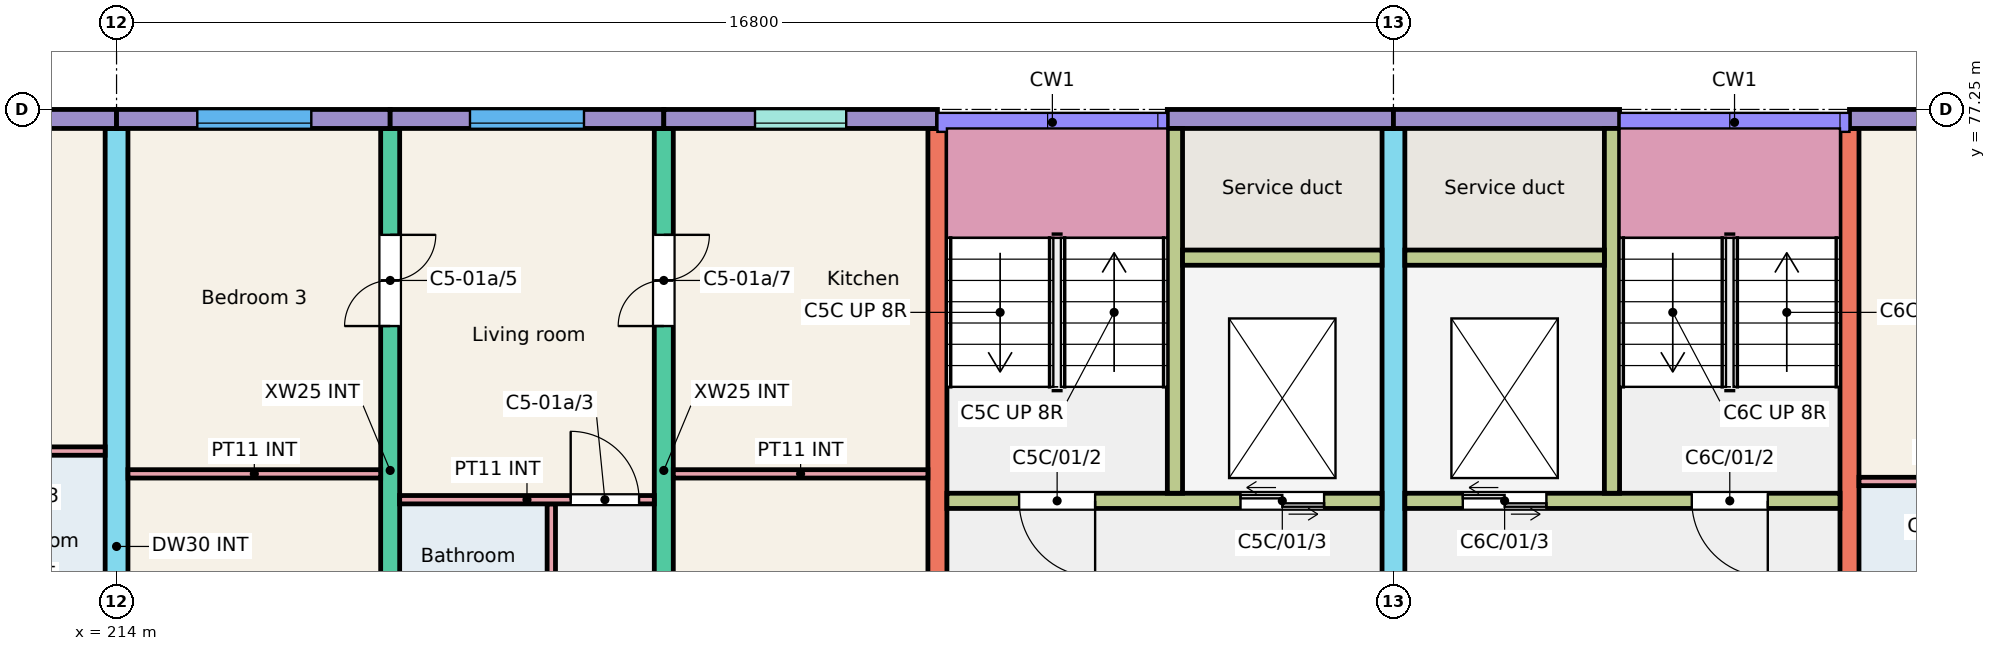
"""IFC4 building model, lengths in metres.
Left out: names, types, materials, properties, quantities, classifications, styles, units other than length and angle.
Written with IfcOpenShell. Run it as: python <this file> out.ifc"""

import sys

from ifc_helpers import new_model, si_unit, direction, frame, frame_2d, origin, place, context, subcontext, project, spatial, rectangle, extrude, element, fill, save


model = new_model("IFC4")
c1 = context("Model", 3, precision=1e-05, world=origin(), true_north=direction((0.0, 1.0)))
c2 = subcontext(c1, "Body", "Model", "MODEL_VIEW")
j1 = project(units=[si_unit("LENGTHUNIT", "METRE"), si_unit("PLANEANGLEUNIT", "RADIAN")], contexts=[c1])
p1 = place(None, origin())
s1 = spatial("IfcSite", under=j1, at=p1, CompositionType="ELEMENT")
p2 = place(p1, origin())
s2 = spatial("IfcBuilding", under=s1, at=p2, CompositionType="ELEMENT")
p3 = place(p2, frame((0.0, 0.0, 3.0)))
s3 = spatial("IfcBuildingStorey", under=s2, at=p3, CompositionType="ELEMENT", Elevation=3.0)
p4 = place(p3, frame((214.0, 66.0, 0.0), z_axis=(0.0, 0.0, 1.0), x_axis=(0.0, 1.0, 0.0)))
e1 = element("IfcWall", 1, at=p4, inside=s3, PredefinedType="SHEAR", context=c2, shape_type="SweptSolid", body=[
    extrude(rectangle(XDim=11.0, YDim=0.3, at=frame_2d((5.5, 0.0))), origin(), (0.0, 0.0, 1.0), 3.0),
])
p5 = place(p4, frame((0.3, 0.0, 0.0)))
e2 = element("IfcOpeningElement", 2, at=p5, cuts=e1, PredefinedType="OPENING", context=c2, shape_type="SweptSolid", body=[
    extrude(rectangle(XDim=1.2, YDim=2.1, at=frame_2d((0.6, 1.05))), frame((0.0, 0.16, 0.0), z_axis=(0.0, -1.0, 0.0), x_axis=(1.0, 0.0, 0.0)), (0.0, 0.0, 1.0), 0.32),
])
p6 = place(p3, frame((217.6, 68.0, 0.0), z_axis=(0.0, 0.0, 1.0), x_axis=(0.0, 1.0, 0.0)))
e3 = element("IfcWall", 3, at=p6, inside=s3, PredefinedType="SHEAR", context=c2, shape_type="SweptSolid", body=[
    extrude(rectangle(XDim=9.0, YDim=0.25, at=frame_2d((4.5, 0.0))), origin(), (0.0, 0.0, 1.0), 3.0),
])
p7 = place(p6, frame((0.175, 0.0, 0.0)))
e4 = element("IfcOpeningElement", 4, at=p7, cuts=e3, PredefinedType="OPENING", context=c2, shape_type="SweptSolid", body=[
    extrude(rectangle(XDim=1.2, YDim=2.1, at=frame_2d((0.6, 1.05))), frame((0.0, 0.135, 0.0), z_axis=(0.0, -1.0, 0.0), x_axis=(1.0, 0.0, 0.0)), (0.0, 0.0, 1.0), 0.27),
])
p8 = place(p6, frame((6.4, 0.0, 0.0)))
e5 = element("IfcOpeningElement", 5, at=p8, cuts=e3, PredefinedType="OPENING", context=c2, shape_type="SweptSolid", body=[
    extrude(rectangle(XDim=1.2, YDim=2.1, at=frame_2d((0.6, 1.05))), frame((0.0, 0.135, 0.0), z_axis=(0.0, -1.0, 0.0), x_axis=(1.0, 0.0, 0.0)), (0.0, 0.0, 1.0), 0.27),
])
p9 = place(p3, frame((221.2, 68.0, 0.0), z_axis=(0.0, 0.0, 1.0), x_axis=(0.0, 1.0, 0.0)))
e6 = element("IfcWall", 6, at=p9, inside=s3, PredefinedType="SHEAR", context=c2, shape_type="SweptSolid", body=[
    extrude(rectangle(XDim=9.0, YDim=0.25, at=frame_2d((4.5, 0.0))), origin(), (0.0, 0.0, 1.0), 3.0),
])
p10 = place(p9, frame((0.175, 0.0, 0.0)))
e7 = element("IfcOpeningElement", 7, at=p10, cuts=e6, PredefinedType="OPENING", context=c2, shape_type="SweptSolid", body=[
    extrude(rectangle(XDim=1.2, YDim=2.1, at=frame_2d((0.6, 1.05))), frame((0.0, 0.135, 0.0), z_axis=(0.0, -1.0, 0.0), x_axis=(1.0, 0.0, 0.0)), (0.0, 0.0, 1.0), 0.27),
])
p11 = place(p9, frame((6.4, 0.0, 0.0)))
e8 = element("IfcOpeningElement", 8, at=p11, cuts=e6, PredefinedType="OPENING", context=c2, shape_type="SweptSolid", body=[
    extrude(rectangle(XDim=1.2, YDim=2.1, at=frame_2d((0.6, 1.05))), frame((0.0, 0.135, 0.0), z_axis=(0.0, -1.0, 0.0), x_axis=(1.0, 0.0, 0.0)), (0.0, 0.0, 1.0), 0.27),
])
p12 = place(p3, frame((224.8, 68.0, 0.0), z_axis=(0.0, 0.0, 1.0), x_axis=(0.0, 1.0, 0.0)))
e9 = element("IfcWall", 9, at=p12, inside=s3, PredefinedType="SHEAR", context=c2, shape_type="SweptSolid", body=[
    extrude(rectangle(XDim=9.0, YDim=0.25, at=frame_2d((4.5, 0.0))), origin(), (0.0, 0.0, 1.0), 3.0),
])
p13 = place(p3, frame((230.8, 66.0, 0.0), z_axis=(0.0, 0.0, 1.0), x_axis=(0.0, 1.0, 0.0)))
e10 = element("IfcWall", 10, at=p13, inside=s3, PredefinedType="SHEAR", context=c2, shape_type="SweptSolid", body=[
    extrude(rectangle(XDim=11.0, YDim=0.3, at=frame_2d((5.5, 0.0))), origin(), (0.0, 0.0, 1.0), 3.0),
])
p14 = place(p13, frame((0.3, 0.0, 0.0)))
e11 = element("IfcOpeningElement", 11, at=p14, cuts=e10, PredefinedType="OPENING", context=c2, shape_type="SweptSolid", body=[
    extrude(rectangle(XDim=1.2, YDim=2.1, at=frame_2d((0.6, 1.05))), frame((0.0, 0.16, 0.0), z_axis=(0.0, -1.0, 0.0), x_axis=(1.0, 0.0, 0.0)), (0.0, 0.0, 1.0), 0.32),
])
p15 = place(p3, frame((236.8, 68.0, 0.0), z_axis=(0.0, 0.0, 1.0), x_axis=(0.0, 1.0, 0.0)))
e12 = element("IfcWall", 12, at=p15, inside=s3, PredefinedType="SHEAR", context=c2, shape_type="SweptSolid", body=[
    extrude(rectangle(XDim=9.0, YDim=0.25, at=frame_2d((4.5, 0.0))), origin(), (0.0, 0.0, 1.0), 3.0),
])
p16 = place(p3, frame((210.4, 77.125, 0.0), z_axis=(0.0, 0.0, 1.0), x_axis=(1.0, 0.0, 0.0)))
e13 = element("IfcWall", 13, at=p16, inside=s3, PredefinedType="SOLIDWALL", context=c2, shape_type="SweptSolid", body=[
    extrude(rectangle(XDim=3.6, YDim=0.25, at=frame_2d((1.8, 0.0))), origin(), (0.0, 0.0, 1.0), 3.0),
])
p17 = place(p16, frame((1.025, 0.0, 0.9)))
e14 = element("IfcOpeningElement", 14, at=p17, cuts=e13, PredefinedType="OPENING", context=c2, shape_type="SweptSolid", body=[
    extrude(rectangle(XDim=1.5, YDim=1.5, at=frame_2d((0.75, 0.75))), frame((0.0, 0.135, 0.0), z_axis=(0.0, -1.0, 0.0), x_axis=(1.0, 0.0, 0.0)), (0.0, 0.0, 1.0), 0.27),
])
p18 = place(p3, frame((214.0, 77.125, 0.0), z_axis=(0.0, 0.0, 1.0), x_axis=(1.0, 0.0, 0.0)))
e15 = element("IfcWall", 15, at=p18, inside=s3, PredefinedType="SOLIDWALL", context=c2, shape_type="SweptSolid", body=[
    extrude(rectangle(XDim=3.6, YDim=0.25, at=frame_2d((1.8, 0.0))), origin(), (0.0, 0.0, 1.0), 3.0),
])
p19 = place(p18, frame((1.062, 0.0, 0.9)))
e16 = element("IfcOpeningElement", 16, at=p19, cuts=e15, PredefinedType="OPENING", context=c2, shape_type="SweptSolid", body=[
    extrude(rectangle(XDim=1.5, YDim=1.5, at=frame_2d((0.75, 0.75))), frame((0.0, 0.135, 0.0), z_axis=(0.0, -1.0, 0.0), x_axis=(1.0, 0.0, 0.0)), (0.0, 0.0, 1.0), 0.27),
])
p20 = place(p3, frame((217.6, 77.125, 0.0), z_axis=(0.0, 0.0, 1.0), x_axis=(1.0, 0.0, 0.0)))
e17 = element("IfcWall", 17, at=p20, inside=s3, PredefinedType="SOLIDWALL", context=c2, shape_type="SweptSolid", body=[
    extrude(rectangle(XDim=3.6, YDim=0.25, at=frame_2d((1.8, 0.0))), origin(), (0.0, 0.0, 1.0), 3.0),
])
p21 = place(p20, frame((1.05, 0.0, 0.9)))
e18 = element("IfcOpeningElement", 18, at=p21, cuts=e17, PredefinedType="OPENING", context=c2, shape_type="SweptSolid", body=[
    extrude(rectangle(XDim=1.5, YDim=1.5, at=frame_2d((0.75, 0.75))), frame((0.0, 0.135, 0.0), z_axis=(0.0, -1.0, 0.0), x_axis=(1.0, 0.0, 0.0)), (0.0, 0.0, 1.0), 0.27),
])
p22 = place(p3, frame((221.2, 77.125, 0.0), z_axis=(0.0, 0.0, 1.0), x_axis=(1.0, 0.0, 0.0)))
e19 = element("IfcWall", 19, at=p22, inside=s3, PredefinedType="SOLIDWALL", context=c2, shape_type="SweptSolid", body=[
    extrude(rectangle(XDim=3.6, YDim=0.25, at=frame_2d((1.8, 0.0))), origin(), (0.0, 0.0, 1.0), 3.0),
])
p23 = place(p22, frame((1.2, 0.0, 1.1)))
e20 = element("IfcOpeningElement", 20, at=p23, cuts=e19, PredefinedType="OPENING", context=c2, shape_type="SweptSolid", body=[
    extrude(rectangle(XDim=1.2, YDim=1.3, at=frame_2d((0.6, 0.65))), frame((0.0, 0.135, 0.0), z_axis=(0.0, -1.0, 0.0), x_axis=(1.0, 0.0, 0.0)), (0.0, 0.0, 1.0), 0.27),
])
p24 = place(p3, frame((227.825, 77.125, 0.0), z_axis=(0.0, 0.0, 1.0), x_axis=(1.0, 0.0, 0.0)))
e21 = element("IfcWall", 21, at=p24, inside=s3, PredefinedType="SOLIDWALL", context=c2, shape_type="SweptSolid", body=[
    extrude(rectangle(XDim=2.975, YDim=0.25, at=frame_2d((1.488, 0.0))), origin(), (0.0, 0.0, 1.0), 3.0),
])
p25 = place(p3, frame((224.925, 72.1, 0.0), z_axis=(0.0, 0.0, 1.0), x_axis=(1.0, 0.0, 0.0)))
e22 = element("IfcWall", 22, at=p25, inside=s3, PredefinedType="SHEAR", context=c2, shape_type="SweptSolid", body=[
    extrude(rectangle(XDim=5.725, YDim=0.2, at=frame_2d((2.862, 0.0))), origin(), (0.0, 0.0, 1.0), 3.0),
])
p26 = place(p25, frame((0.95, 0.0, 0.0)))
e23 = element("IfcOpeningElement", 23, at=p26, cuts=e22, PredefinedType="OPENING", context=c2, shape_type="SweptSolid", body=[
    extrude(rectangle(XDim=1.0, YDim=2.1, at=frame_2d((0.5, 1.05))), frame((0.0, 0.11, 0.0), z_axis=(0.0, -1.0, 0.0), x_axis=(1.0, 0.0, 0.0)), (0.0, 0.0, 1.0), 0.22),
])
p27 = place(p25, frame((3.863, 0.0, 0.0)))
e24 = element("IfcOpeningElement", 24, at=p27, cuts=e22, PredefinedType="OPENING", context=c2, shape_type="SweptSolid", body=[
    extrude(rectangle(XDim=1.1, YDim=2.1, at=frame_2d((0.55, 1.05))), frame((0.0, 0.11, 0.0), z_axis=(0.0, -1.0, 0.0), x_axis=(1.0, 0.0, 0.0)), (0.0, 0.0, 1.0), 0.22),
])
p28 = place(p3, frame((227.925, 72.2, 0.0), z_axis=(0.0, 0.0, 1.0), x_axis=(0.0, 1.0, 0.0)))
e25 = element("IfcWall", 25, at=p28, inside=s3, PredefinedType="SHEAR", context=c2, shape_type="SweptSolid", body=[
    extrude(rectangle(XDim=4.8, YDim=0.2, at=frame_2d((2.4, 0.0))), origin(), (0.0, 0.0, 1.0), 3.0),
])
p29 = place(p3, frame((228.025, 75.3, 0.0), z_axis=(0.0, 0.0, 1.0), x_axis=(1.0, 0.0, 0.0)))
e26 = element("IfcWall", 26, at=p29, inside=s3, PredefinedType="SHEAR", context=c2, shape_type="SweptSolid", body=[
    extrude(rectangle(XDim=2.625, YDim=0.2, at=frame_2d((1.312, 0.0))), origin(), (0.0, 0.0, 1.0), 3.0),
])
p30 = place(p3, frame((230.8, 77.125, 0.0), z_axis=(0.0, 0.0, 1.0), x_axis=(1.0, 0.0, 0.0)))
e27 = element("IfcWall", 27, at=p30, inside=s3, PredefinedType="SOLIDWALL", context=c2, shape_type="SweptSolid", body=[
    extrude(rectangle(XDim=2.975, YDim=0.25, at=frame_2d((1.487, 0.0))), origin(), (0.0, 0.0, 1.0), 3.0),
])
p31 = place(p3, frame((230.95, 72.1, 0.0), z_axis=(0.0, 0.0, 1.0), x_axis=(1.0, 0.0, 0.0)))
e28 = element("IfcWall", 28, at=p31, inside=s3, PredefinedType="SHEAR", context=c2, shape_type="SweptSolid", body=[
    extrude(rectangle(XDim=5.725, YDim=0.2, at=frame_2d((2.863, 0.0))), origin(), (0.0, 0.0, 1.0), 3.0),
])
p32 = place(p31, frame((3.775, 0.0, 0.0)))
e29 = element("IfcOpeningElement", 29, at=p32, cuts=e28, PredefinedType="OPENING", context=c2, shape_type="SweptSolid", body=[
    extrude(rectangle(XDim=1.0, YDim=2.1, at=frame_2d((0.5, 1.05))), frame((0.0, 0.11, 0.0), z_axis=(0.0, -1.0, 0.0), x_axis=(1.0, 0.0, 0.0)), (0.0, 0.0, 1.0), 0.22),
])
p33 = place(p31, frame((0.762, 0.0, 0.0)))
e30 = element("IfcOpeningElement", 30, at=p33, cuts=e28, PredefinedType="OPENING", context=c2, shape_type="SweptSolid", body=[
    extrude(rectangle(XDim=1.1, YDim=2.1, at=frame_2d((0.55, 1.05))), frame((0.0, 0.11, 0.0), z_axis=(0.0, -1.0, 0.0), x_axis=(1.0, 0.0, 0.0)), (0.0, 0.0, 1.0), 0.22),
])
p34 = place(p3, frame((233.675, 72.2, 0.0), z_axis=(0.0, 0.0, 1.0), x_axis=(0.0, 1.0, 0.0)))
e31 = element("IfcWall", 31, at=p34, inside=s3, PredefinedType="SHEAR", context=c2, shape_type="SweptSolid", body=[
    extrude(rectangle(XDim=4.8, YDim=0.2, at=frame_2d((2.4, 0.0))), origin(), (0.0, 0.0, 1.0), 3.0),
])
p35 = place(p3, frame((230.95, 75.3, 0.0), z_axis=(0.0, 0.0, 1.0), x_axis=(1.0, 0.0, 0.0)))
e32 = element("IfcWall", 32, at=p35, inside=s3, PredefinedType="SHEAR", context=c2, shape_type="SweptSolid", body=[
    extrude(rectangle(XDim=2.625, YDim=0.2, at=frame_2d((1.312, 0.0))), origin(), (0.0, 0.0, 1.0), 3.0),
])
p36 = place(p3, frame((236.8, 77.125, 0.0), z_axis=(0.0, 0.0, 1.0), x_axis=(1.0, 0.0, 0.0)))
e33 = element("IfcWall", 33, at=p36, inside=s3, PredefinedType="SOLIDWALL", context=c2, shape_type="SweptSolid", body=[
    extrude(rectangle(XDim=3.6, YDim=0.25, at=frame_2d((1.8, 0.0))), origin(), (0.0, 0.0, 1.0), 3.0),
])
p37 = place(p36, frame((1.062, 0.0, 0.9)))
e34 = element("IfcOpeningElement", 34, at=p37, cuts=e33, PredefinedType="OPENING", context=c2, shape_type="SweptSolid", body=[
    extrude(rectangle(XDim=1.5, YDim=1.5, at=frame_2d((0.75, 0.75))), frame((0.0, 0.135, 0.0), z_axis=(0.0, -1.0, 0.0), x_axis=(1.0, 0.0, 0.0)), (0.0, 0.0, 1.0), 0.27),
])
p38 = place(p3, frame((210.5, 72.755, 0.0), z_axis=(0.0, 0.0, 1.0), x_axis=(1.0, 0.0, 0.0)))
e35 = element("IfcWall", 35, at=p38, inside=s3, PredefinedType="PARTITIONING", context=c2, shape_type="SweptSolid", body=[
    extrude(rectangle(XDim=3.35, YDim=0.11, at=frame_2d((1.675, 0.0))), origin(), (0.0, 0.0, 1.0), 2.8),
])
p39 = place(p38, frame((0.2, 0.0, 0.0)))
e36 = element("IfcOpeningElement", 36, at=p39, cuts=e35, PredefinedType="OPENING", context=c2, shape_type="SweptSolid", body=[
    extrude(rectangle(XDim=0.9, YDim=2.1, at=frame_2d((0.45, 1.05))), frame((0.0, 0.065, 0.0), z_axis=(0.0, -1.0, 0.0), x_axis=(1.0, 0.0, 0.0)), (0.0, 0.0, 1.0), 0.13),
])
p40 = place(p3, frame((219.72, 69.66, 0.0), z_axis=(0.0, 0.0, 1.0), x_axis=(0.0, 1.0, 0.0)))
e37 = element("IfcWall", 37, at=p40, inside=s3, PredefinedType="PARTITIONING", context=c2, shape_type="SweptSolid", body=[
    extrude(rectangle(XDim=2.4, YDim=0.11, at=frame_2d((1.2, 0.0))), origin(), (0.0, 0.0, 1.0), 2.8),
])
p41 = place(p3, frame((217.725, 72.115, 0.0), z_axis=(0.0, 0.0, 1.0), x_axis=(1.0, 0.0, 0.0)))
e38 = element("IfcWall", 38, at=p41, inside=s3, PredefinedType="PARTITIONING", context=c2, shape_type="SweptSolid", body=[
    extrude(rectangle(XDim=3.35, YDim=0.11, at=frame_2d((1.675, 0.0))), origin(), (0.0, 0.0, 1.0), 2.8),
])
p42 = place(p41, frame((2.25, 0.0, 0.0)))
e39 = element("IfcOpeningElement", 39, at=p42, cuts=e38, PredefinedType="OPENING", context=c2, shape_type="SweptSolid", body=[
    extrude(rectangle(XDim=0.9, YDim=2.1, at=frame_2d((0.45, 1.05))), frame((0.0, 0.065, 0.0), z_axis=(0.0, -1.0, 0.0), x_axis=(1.0, 0.0, 0.0)), (0.0, 0.0, 1.0), 0.13),
])
p43 = place(p3, frame((214.15, 72.455, 0.0), z_axis=(0.0, 0.0, 1.0), x_axis=(1.0, 0.0, 0.0)))
e40 = element("IfcWall", 40, at=p43, inside=s3, PredefinedType="PARTITIONING", context=c2, shape_type="SweptSolid", body=[
    extrude(rectangle(XDim=3.325, YDim=0.11, at=frame_2d((1.663, 0.0))), origin(), (0.0, 0.0, 1.0), 2.8),
])
p44 = place(p3, frame((221.325, 72.455, 0.0), z_axis=(0.0, 0.0, 1.0), x_axis=(1.0, 0.0, 0.0)))
e41 = element("IfcWall", 41, at=p44, inside=s3, PredefinedType="PARTITIONING", context=c2, shape_type="SweptSolid", body=[
    extrude(rectangle(XDim=3.35, YDim=0.11, at=frame_2d((1.675, 0.0))), origin(), (0.0, 0.0, 1.0), 2.8),
])
p45 = place(p3, frame((236.925, 72.355, 0.0), z_axis=(0.0, 0.0, 1.0), x_axis=(1.0, 0.0, 0.0)))
e42 = element("IfcWall", 42, at=p45, inside=s3, PredefinedType="PARTITIONING", context=c2, shape_type="SweptSolid", body=[
    extrude(rectangle(XDim=3.375, YDim=0.11, at=frame_2d((1.688, 0.0))), origin(), (0.0, 0.0, 1.0), 2.8),
])
p46 = place(p45, frame((2.275, 0.0, 0.0)))
e43 = element("IfcOpeningElement", 43, at=p46, cuts=e42, PredefinedType="OPENING", context=c2, shape_type="SweptSolid", body=[
    extrude(rectangle(XDim=0.9, YDim=2.1, at=frame_2d((0.45, 1.05))), frame((0.0, 0.065, 0.0), z_axis=(0.0, -1.0, 0.0), x_axis=(1.0, 0.0, 0.0)), (0.0, 0.0, 1.0), 0.13),
])
p47 = place(p19, origin())
e44 = element("IfcWindow", 44, at=p47, inside=s3, PartitioningType="SINGLE_PANEL", PredefinedType="WINDOW", context=c2, shape_type="SweptSolid", body=[
    extrude(rectangle(XDim=1.5, YDim=1.5, at=frame_2d((0.75, 0.75))), frame((0.0, -0.025, 0.0), z_axis=(0.0, -1.0, 0.0), x_axis=(1.0, 0.0, 0.0)), (0.0, 0.0, 1.0), 0.06),
])
fill(e16, e44)
p48 = place(p23, origin())
e45 = element("IfcWindow", 45, at=p48, inside=s3, PartitioningType="SINGLE_PANEL", PredefinedType="WINDOW", context=c2, shape_type="SweptSolid", body=[
    extrude(rectangle(XDim=1.2, YDim=1.3, at=frame_2d((0.6, 0.65))), frame((0.0, -0.025, 0.0), z_axis=(0.0, -1.0, 0.0), x_axis=(1.0, 0.0, 0.0)), (0.0, 0.0, 1.0), 0.06),
])
fill(e20, e45)
p49 = place(p21, origin())
e46 = element("IfcWindow", 46, at=p49, inside=s3, PartitioningType="SINGLE_PANEL", PredefinedType="WINDOW", context=c2, shape_type="SweptSolid", body=[
    extrude(rectangle(XDim=1.5, YDim=1.5, at=frame_2d((0.75, 0.75))), frame((0.0, -0.025, 0.0), z_axis=(0.0, -1.0, 0.0), x_axis=(1.0, 0.0, 0.0)), (0.0, 0.0, 1.0), 0.06),
])
fill(e18, e46)
p50 = place(p42, origin())
e47 = element("IfcDoor", 47, at=p50, inside=s3, OperationType="SINGLE_SWING_LEFT", PredefinedType="DOOR", context=c2, shape_type="SweptSolid", body=[
    extrude(rectangle(XDim=0.9, YDim=2.1, at=frame_2d((0.45, 1.05))), frame((0.0, 0.025, 0.0), z_axis=(0.0, -1.0, 0.0), x_axis=(1.0, 0.0, 0.0)), (0.0, 0.0, 1.0), 0.05),
])
fill(e39, e47)
p51 = place(p8, origin())
e48 = element("IfcDoor", 48, at=p51, inside=s3, OperationType="DOUBLE_DOOR_SINGLE_SWING", PredefinedType="DOOR", context=c2, shape_type="SweptSolid", body=[
    extrude(rectangle(XDim=1.2, YDim=2.1, at=frame_2d((0.6, 1.05))), frame((0.0, 0.025, 0.0), z_axis=(0.0, -1.0, 0.0), x_axis=(1.0, 0.0, 0.0)), (0.0, 0.0, 1.0), 0.05),
])
fill(e5, e48)
p52 = place(p11, origin())
e49 = element("IfcDoor", 49, at=p52, inside=s3, OperationType="DOUBLE_DOOR_SINGLE_SWING", PredefinedType="DOOR", context=c2, shape_type="SweptSolid", body=[
    extrude(rectangle(XDim=1.2, YDim=2.1, at=frame_2d((0.6, 1.05))), frame((0.0, 0.025, 0.0), z_axis=(0.0, -1.0, 0.0), x_axis=(1.0, 0.0, 0.0)), (0.0, 0.0, 1.0), 0.05),
])
fill(e8, e49)
p53 = place(p26, origin())
e50 = element("IfcDoor", 50, at=p53, inside=s3, OperationType="SINGLE_SWING_RIGHT", PredefinedType="DOOR", context=c2, shape_type="SweptSolid", body=[
    extrude(rectangle(XDim=1.0, YDim=2.1, at=frame_2d((0.5, 1.05))), frame((0.0, 0.025, 0.0), z_axis=(0.0, -1.0, 0.0), x_axis=(1.0, 0.0, 0.0)), (0.0, 0.0, 1.0), 0.05),
])
fill(e23, e50)
p54 = place(p27, origin())
e51 = element("IfcDoor", 51, at=p54, inside=s3, OperationType="DOUBLE_DOOR_SLIDING", PredefinedType="DOOR", context=c2, shape_type="SweptSolid", body=[
    extrude(rectangle(XDim=1.1, YDim=2.1, at=frame_2d((0.55, 1.05))), frame((0.0, 0.025, 0.0), z_axis=(0.0, -1.0, 0.0), x_axis=(1.0, 0.0, 0.0)), (0.0, 0.0, 1.0), 0.05),
])
fill(e24, e51)
p55 = place(p32, origin())
e52 = element("IfcDoor", 52, at=p55, inside=s3, OperationType="SINGLE_SWING_RIGHT", PredefinedType="DOOR", context=c2, shape_type="SweptSolid", body=[
    extrude(rectangle(XDim=1.0, YDim=2.1, at=frame_2d((0.5, 1.05))), frame((0.0, 0.025, 0.0), z_axis=(0.0, -1.0, 0.0), x_axis=(1.0, 0.0, 0.0)), (0.0, 0.0, 1.0), 0.05),
])
fill(e29, e52)
p56 = place(p33, origin())
e53 = element("IfcDoor", 53, at=p56, inside=s3, OperationType="DOUBLE_DOOR_SLIDING", PredefinedType="DOOR", context=c2, shape_type="SweptSolid", body=[
    extrude(rectangle(XDim=1.1, YDim=2.1, at=frame_2d((0.55, 1.05))), frame((0.0, 0.025, 0.0), z_axis=(0.0, -1.0, 0.0), x_axis=(1.0, 0.0, 0.0)), (0.0, 0.0, 1.0), 0.05),
])
fill(e30, e53)
save(model, sys.argv[1])
